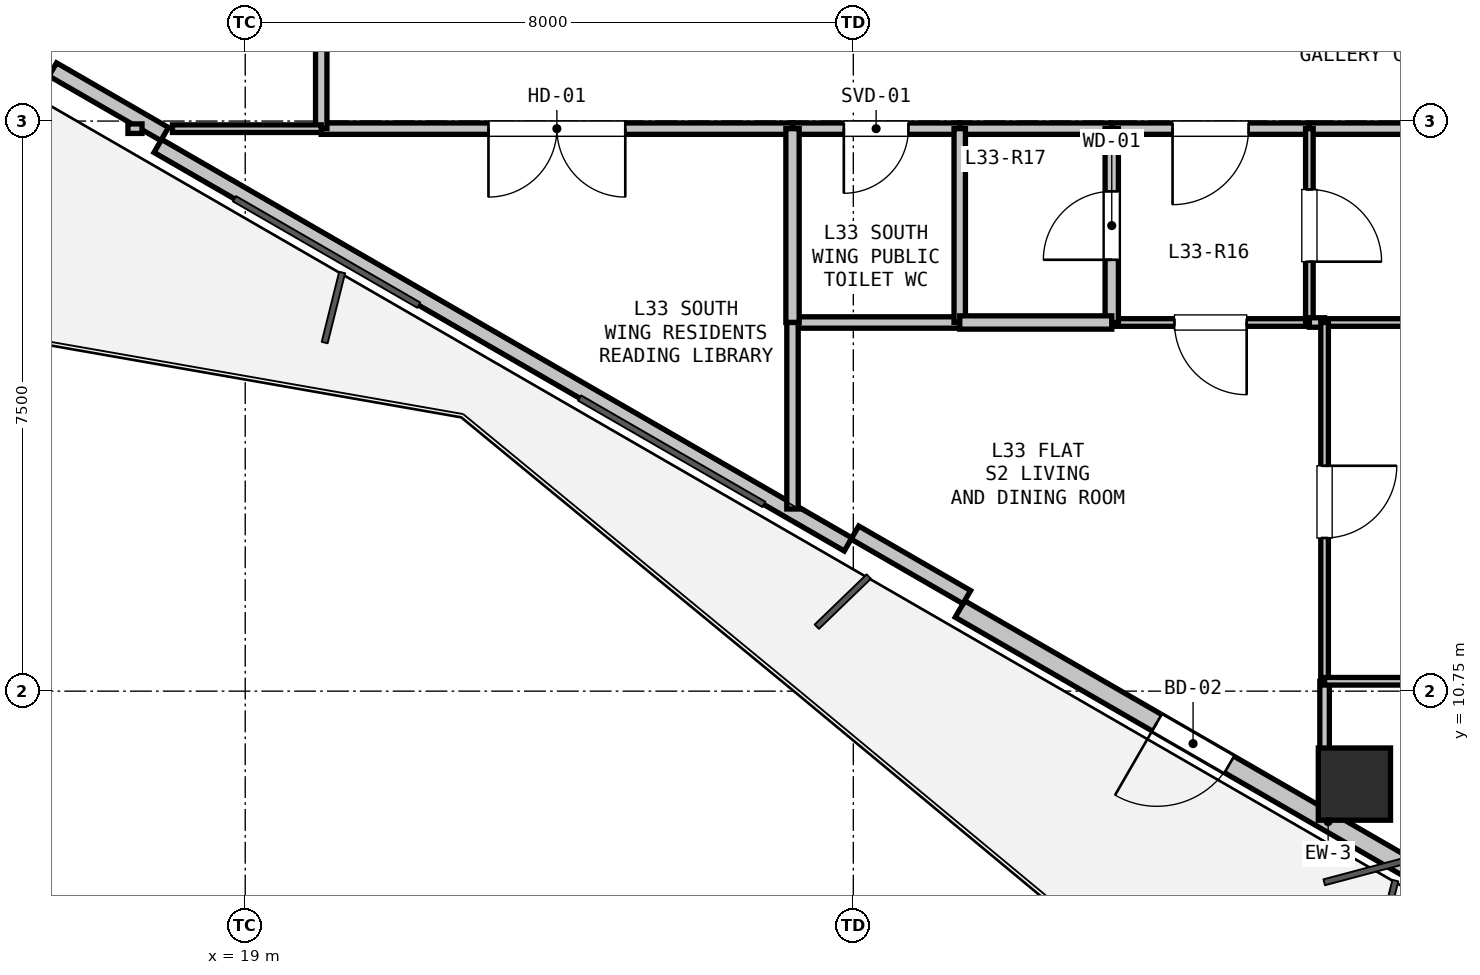
"""IFC4 building model, lengths in metres.
Left out: names, types, materials, properties, quantities, classifications, styles, units other than length and angle.
Written with IfcOpenShell. Run it as: python <this file> out.ifc"""

import sys

from ifc_helpers import new_model, si_unit, direction, frame, frame_2d, origin, origin_2d, place, context, subcontext, project, spatial, rectangle, hollow_rectangle, extrude, element, fill, save


model = new_model("IFC4")
c1 = context("Model", 3, precision=1e-05, world=origin(), true_north=direction((0.0, 1.0)))
c2 = subcontext(c1, "Body", "Model", "MODEL_VIEW")
j1 = project(units=[si_unit("LENGTHUNIT", "METRE"), si_unit("PLANEANGLEUNIT", "RADIAN")], contexts=[c1])
p1 = place(None, origin())
s1 = spatial("IfcSite", under=j1, at=p1, CompositionType="ELEMENT")
p2 = place(p1, origin())
s2 = spatial("IfcBuilding", under=s1, at=p2, CompositionType="ELEMENT")
p3 = place(p2, frame((0.0, 0.0, 121.2)))
s3 = spatial("IfcBuildingStorey", under=s2, at=p3, CompositionType="ELEMENT", Elevation=121.2)
p4 = place(p3, frame((33.593, 9.527, -0.24), z_axis=(0.0, 0.0, 1.0), x_axis=(1.0, 0.0, 0.0)))
e1 = element("IfcColumn", 1, at=p4, inside=s3, PredefinedType="COLUMN", context=c2, shape_type="SweptSolid", body=[
    extrude(hollow_rectangle(XDim=0.95, YDim=0.95, WallThickness=0.028, at=origin_2d()), origin(), (0.0, 0.0, 1.0), 3.54),
])
p5 = place(p3, frame((38.091, 6.237, 0.0), z_axis=(0.0, 0.0, 1.0), x_axis=(-0.86602239209, 0.500005216371, 0.0)))
e2 = element("IfcWall", 2, at=p5, inside=s3, PredefinedType="SOLIDWALL", context=c2, shape_type="SweptSolid", body=[
    extrude(rectangle(XDim=11.186, YDim=0.25, at=frame_2d((5.593, 0.0))), origin(), (0.0, 0.0, 1.0), 2.68),
])
p6 = place(p5, frame((7.095, 0.0, 0.0)))
e3 = element("IfcOpeningElement", 3, at=p6, cuts=e2, PredefinedType="OPENING", context=c2, shape_type="SweptSolid", body=[
    extrude(rectangle(XDim=1.1, YDim=2.1, at=frame_2d((0.55, 1.05))), frame((0.0, 0.135, 0.0), z_axis=(0.0, -1.0, 0.0), x_axis=(1.0, 0.0, 0.0)), (0.0, 0.0, 1.0), 0.27),
])
p7 = place(p5, frame((2.322, 0.0, 0.9)))
e4 = element("IfcOpeningElement", 4, at=p7, cuts=e2, PredefinedType="OPENING", context=c2, shape_type="SweptSolid", body=[
    extrude(rectangle(XDim=1.2, YDim=1.4, at=frame_2d((0.6, 0.7))), frame((0.0, 0.135, 0.0), z_axis=(0.0, -1.0, 0.0), x_axis=(1.0, 0.0, 0.0)), (0.0, 0.0, 1.0), 0.27),
])
p8 = place(p3, frame((26.931, 12.68, 0.0), z_axis=(0.0, 0.0, 1.0), x_axis=(-0.866026619769, 0.499997893847, 0.0)))
e5 = element("IfcWall", 5, at=p8, inside=s3, PredefinedType="PARAPET", context=c2, shape_type="SweptSolid", body=[
    extrude(rectangle(XDim=10.486, YDim=0.2, at=frame_2d((5.243, 0.0))), origin(), (0.0, 0.0, 1.0), 0.2),
])
for number, where, z_axis, x_axis in (
    (6, (28.493, 11.986, 0.0), (0.0, 0.0, 1.0), (-0.866, 0.5, 0.0)),
    (7, (17.94, 18.079, 0.0), (0.0, 0.0, 1.0), (-0.866, 0.5, 0.0)),
):
    element("IfcWall", number, at=place(p3, frame(where, z_axis=z_axis, x_axis=x_axis)), inside=s3, PredefinedType="PARAPET", context=c2, shape_type="SweptSolid", body=[
        extrude(rectangle(XDim=1.7, YDim=0.2, at=frame_2d((0.85, 0.0))), origin(), (0.0, 0.0, 1.0), 2.68),
    ])
p9 = place(p3, frame((39.2, 18.15, 0.0), z_axis=(0.0, 0.0, 1.0), x_axis=(-1.0, 0.0, 0.0)))
e8 = element("IfcWall", 8, at=p9, inside=s3, PredefinedType="PARTITIONING", context=c2, shape_type="SweptSolid", body=[
    extrude(rectangle(XDim=6.2, YDim=0.15, at=frame_2d((3.1, 0.0))), origin(), (0.0, 0.0, 1.0), 2.433),
])
p10 = place(p3, frame((33.0, 18.15, 0.0), z_axis=(0.0, 0.0, 1.0), x_axis=(-1.0, 0.0, 0.0)))
e9 = element("IfcWall", 9, at=p10, inside=s3, PredefinedType="PARTITIONING", context=c2, shape_type="SweptSolid", body=[
    extrude(rectangle(XDim=2.6, YDim=0.15, at=frame_2d((1.3, 0.0))), origin(), (0.0, 0.0, 1.0), 3.06),
])
p11 = place(p10, frame((0.8, 0.0, 0.0)))
e10 = element("IfcOpeningElement", 10, at=p11, cuts=e9, PredefinedType="OPENING", context=c2, shape_type="SweptSolid", body=[
    extrude(rectangle(XDim=1.0, YDim=2.15, at=frame_2d((0.5, 1.075))), frame((0.0, 0.085, 0.0), z_axis=(0.0, -1.0, 0.0), x_axis=(1.0, 0.0, 0.0)), (0.0, 0.0, 1.0), 0.17),
])
p12 = place(p3, frame((30.4, 18.15, 0.0), z_axis=(0.0, 0.0, 1.0), x_axis=(-1.0, 0.0, 0.0)))
e11 = element("IfcWall", 11, at=p12, inside=s3, PredefinedType="PARTITIONING", context=c2, shape_type="SweptSolid", body=[
    extrude(rectangle(XDim=2.0, YDim=0.15, at=frame_2d((1.0, 0.0))), origin(), (0.0, 0.0, 1.0), 3.06),
])
p13 = place(p3, frame((28.4, 18.15, 0.0), z_axis=(0.0, 0.0, 1.0), x_axis=(-1.0, 0.0, 0.0)))
e12 = element("IfcWall", 12, at=p13, inside=s3, PredefinedType="PARTITIONING", context=c2, shape_type="SweptSolid", body=[
    extrude(rectangle(XDim=2.2, YDim=0.15, at=frame_2d((1.1, 0.0))), origin(), (0.0, 0.0, 1.0), 3.06),
])
p14 = place(p13, frame((0.675, 0.0, 0.0)))
e13 = element("IfcOpeningElement", 13, at=p14, cuts=e12, PredefinedType="OPENING", context=c2, shape_type="SweptSolid", body=[
    extrude(rectangle(XDim=0.85, YDim=2.1, at=frame_2d((0.425, 1.05))), frame((0.0, 0.085, 0.0), z_axis=(0.0, -1.0, 0.0), x_axis=(1.0, 0.0, 0.0)), (0.0, 0.0, 1.0), 0.17),
])
p15 = place(p3, frame((26.2, 18.15, 0.0), z_axis=(0.0, 0.0, 1.0), x_axis=(-1.0, 0.0, 0.0)))
e14 = element("IfcWall", 14, at=p15, inside=s3, PredefinedType="PARTITIONING", context=c2, shape_type="SweptSolid", body=[
    extrude(rectangle(XDim=6.2, YDim=0.15, at=frame_2d((3.1, 0.0))), origin(), (0.0, 0.0, 1.0), 2.433),
])
p16 = place(p15, frame((2.2, 0.0, 0.0)))
e15 = element("IfcOpeningElement", 15, at=p16, cuts=e14, PredefinedType="OPENING", context=c2, shape_type="SweptSolid", body=[
    extrude(rectangle(XDim=1.8, YDim=2.2, at=frame_2d((0.9, 1.1))), frame((0.0, 0.085, 0.0), z_axis=(0.0, -1.0, 0.0), x_axis=(1.0, 0.0, 0.0)), (0.0, 0.0, 1.0), 0.17),
])
p17 = place(p3, frame((20.0, 18.15, 0.0), z_axis=(0.0, 0.0, 1.0), x_axis=(0.0, 1.0, 0.0)))
e16 = element("IfcWall", 16, at=p17, inside=s3, PredefinedType="PARTITIONING", context=c2, shape_type="SweptSolid", body=[
    extrude(rectangle(XDim=2.6, YDim=0.15, at=frame_2d((1.3, 0.0))), origin(), (0.0, 0.0, 1.0), 3.06),
])
p18 = place(p3, frame((33.0, 15.6, 0.0), z_axis=(0.0, 0.0, 1.0), x_axis=(-1.0, 0.0, 0.0)))
e17 = element("IfcWall", 17, at=p18, inside=s3, PredefinedType="PARTITIONING", context=c2, shape_type="SweptSolid", body=[
    extrude(rectangle(XDim=2.6, YDim=0.1, at=frame_2d((1.3, 0.0))), origin(), (0.0, 0.0, 1.0), 3.06),
])
p19 = place(p18, frame((0.825, 0.0, 0.0)))
e18 = element("IfcOpeningElement", 18, at=p19, cuts=e17, PredefinedType="OPENING", context=c2, shape_type="SweptSolid", body=[
    extrude(rectangle(XDim=0.95, YDim=2.1, at=frame_2d((0.475, 1.05))), frame((0.0, 0.06, 0.0), z_axis=(0.0, -1.0, 0.0), x_axis=(1.0, 0.0, 0.0)), (0.0, 0.0, 1.0), 0.12),
])
p20 = place(p3, frame((30.4, 15.6, 0.0), z_axis=(0.0, 0.0, 1.0), x_axis=(0.0, 1.0, 0.0)))
e19 = element("IfcWall", 19, at=p20, inside=s3, PredefinedType="PLUMBINGWALL", context=c2, shape_type="SweptSolid", body=[
    extrude(rectangle(XDim=2.55, YDim=0.175, at=frame_2d((1.275, 0.0))), origin(), (0.0, 0.0, 1.0), 3.06),
])
p21 = place(p20, frame((0.825, 0.0, 0.0)))
e20 = element("IfcOpeningElement", 20, at=p21, cuts=e19, PredefinedType="OPENING", context=c2, shape_type="SweptSolid", body=[
    extrude(rectangle(XDim=0.9, YDim=2.1, at=frame_2d((0.45, 1.05))), frame((0.0, 0.097, 0.0), z_axis=(0.0, -1.0, 0.0), x_axis=(1.0, 0.0, 0.0)), (0.0, 0.0, 1.0), 0.195),
])
p22 = place(p3, frame((33.0, 18.15, 0.0), z_axis=(0.0, 0.0, 1.0), x_axis=(0.0, -1.0, 0.0)))
e21 = element("IfcWall", 21, at=p22, inside=s3, PredefinedType="PARTITIONING", context=c2, shape_type="SweptSolid", body=[
    extrude(rectangle(XDim=2.55, YDim=0.1, at=frame_2d((1.275, 0.0))), origin(), (0.0, 0.0, 1.0), 3.06),
])
p23 = place(p22, frame((0.8, 0.0, 0.0)))
e22 = element("IfcOpeningElement", 22, at=p23, cuts=e21, PredefinedType="OPENING", context=c2, shape_type="SweptSolid", body=[
    extrude(rectangle(XDim=0.95, YDim=2.1, at=frame_2d((0.475, 1.05))), frame((0.0, 0.06, 0.0), z_axis=(0.0, -1.0, 0.0), x_axis=(1.0, 0.0, 0.0)), (0.0, 0.0, 1.0), 0.12),
])
p24 = place(p3, frame((28.4, 15.6, 0.0), z_axis=(0.0, 0.0, 1.0), x_axis=(-1.0, 0.0, 0.0)))
e23 = element("IfcWall", 23, at=p24, inside=s3, PredefinedType="PARTITIONING", context=c2, shape_type="SweptSolid", body=[
    extrude(rectangle(XDim=2.2, YDim=0.15, at=frame_2d((1.1, 0.0))), origin(), (0.0, 0.0, 1.0), 2.433),
])
p25 = place(p3, frame((26.2, 15.6, 0.0), z_axis=(0.0, 0.0, 1.0), x_axis=(0.0, 1.0, 0.0)))
e24 = element("IfcWall", 24, at=p25, inside=s3, PredefinedType="PLUMBINGWALL", context=c2, shape_type="SweptSolid", body=[
    extrude(rectangle(XDim=2.55, YDim=0.175, at=frame_2d((1.275, 0.0))), origin(), (0.0, 0.0, 1.0), 2.433),
])
p26 = place(p3, frame((28.4, 18.15, 0.0), z_axis=(0.0, 0.0, 1.0), x_axis=(0.0, -1.0, 0.0)))
e25 = element("IfcWall", 25, at=p26, inside=s3, PredefinedType="PARTITIONING", context=c2, shape_type="SweptSolid", body=[
    extrude(rectangle(XDim=2.55, YDim=0.15, at=frame_2d((1.275, 0.0))), origin(), (0.0, 0.0, 1.0), 3.06),
])
p27 = place(p3, frame((30.4, 15.6, 0.0), z_axis=(0.0, 0.0, 1.0), x_axis=(-1.0, 0.0, 0.0)))
e26 = element("IfcWall", 26, at=p27, inside=s3, PredefinedType="PLUMBINGWALL", context=c2, shape_type="SweptSolid", body=[
    extrude(rectangle(XDim=2.0, YDim=0.175, at=frame_2d((1.0, 0.0))), origin(), (0.0, 0.0, 1.0), 3.06),
])
p28 = place(p3, frame((42.07, 15.6, 0.0), z_axis=(0.0, 0.0, 1.0), x_axis=(-1.0, 0.0, 0.0)))
e27 = element("IfcWall", 27, at=p28, inside=s3, PredefinedType="PARTITIONING", context=c2, shape_type="SweptSolid", body=[
    extrude(rectangle(XDim=8.87, YDim=0.1, at=frame_2d((4.435, 0.0))), origin(), (0.0, 0.0, 1.0), 2.365),
])
p29 = place(p28, frame((3.96, 0.0, 0.0)))
e28 = element("IfcOpeningElement", 28, at=p29, cuts=e27, PredefinedType="OPENING", context=c2, shape_type="SweptSolid", body=[
    extrude(rectangle(XDim=0.95, YDim=2.1, at=frame_2d((0.475, 1.05))), frame((0.0, 0.06, 0.0), z_axis=(0.0, -1.0, 0.0), x_axis=(1.0, 0.0, 0.0)), (0.0, 0.0, 1.0), 0.12),
])
p30 = place(p3, frame((33.2, 15.6, 0.0), z_axis=(0.0, 0.0, 1.0), x_axis=(-1.0, 0.0, 0.0)))
e29 = element("IfcWall", 29, at=p30, inside=s3, PredefinedType="PARTITIONING", context=c2, shape_type="SweptSolid", body=[
    extrude(rectangle(XDim=0.2, YDim=0.125, at=frame_2d((0.1, 0.0))), origin(), (0.0, 0.0, 1.0), 3.06),
])
p31 = place(p3, frame((17.457, 18.15, 0.0), z_axis=(0.0, 0.0, 1.0), x_axis=(1.0, 0.0, 0.0)))
e30 = element("IfcWall", 30, at=p31, inside=s3, PredefinedType="PARTITIONING", context=c2, shape_type="SweptSolid", body=[
    extrude(rectangle(XDim=0.185, YDim=0.125, at=frame_2d((0.093, 0.0))), origin(), (0.0, 0.0, 1.0), 3.06),
])
p32 = place(p3, frame((18.042, 18.15, 0.0), z_axis=(0.0, 0.0, 1.0), x_axis=(1.0, 0.0, 0.0)))
e31 = element("IfcWall", 31, at=p32, inside=s3, PredefinedType="PARTITIONING", context=c2, shape_type="SweptSolid", body=[
    extrude(rectangle(XDim=1.958, YDim=0.1, at=frame_2d((0.979, 0.0))), origin(), (0.0, 0.0, 1.0), 2.365),
])
p33 = place(p3, frame((26.2, 15.6, 0.0), z_axis=(0.0, 0.0, 1.0), x_axis=(0.0, -1.0, 0.0)))
e32 = element("IfcWall", 32, at=p33, inside=s3, PredefinedType="PARTITIONING", context=c2, shape_type="SweptSolid", body=[
    extrude(rectangle(XDim=2.454, YDim=0.15, at=frame_2d((1.227, 0.0))), origin(), (0.0, 0.0, 1.0), 2.365),
])
p34 = place(p3, frame((33.2, 15.6, 0.0), z_axis=(0.0, 0.0, 1.0), x_axis=(0.0, -1.0, 0.0)))
e33 = element("IfcWall", 33, at=p34, inside=s3, PredefinedType="PARTITIONING", context=c2, shape_type="SweptSolid", body=[
    extrude(rectangle(XDim=4.72, YDim=0.1, at=frame_2d((2.36, 0.0))), origin(), (0.0, 0.0, 1.0), 3.06),
])
p35 = place(p34, frame((1.885, 0.0, 0.0)))
e34 = element("IfcOpeningElement", 34, at=p35, cuts=e33, PredefinedType="OPENING", context=c2, shape_type="SweptSolid", body=[
    extrude(rectangle(XDim=0.95, YDim=2.1, at=frame_2d((0.475, 1.05))), frame((0.0, 0.06, 0.0), z_axis=(0.0, -1.0, 0.0), x_axis=(1.0, 0.0, 0.0)), (0.0, 0.0, 1.0), 0.12),
])
p36 = place(p3, frame((33.2, 10.88, 0.0), z_axis=(0.0, 0.0, 1.0), x_axis=(0.0, -1.0, 0.0)))
e35 = element("IfcWall", 35, at=p36, inside=s3, PredefinedType="PARTITIONING", context=c2, shape_type="SweptSolid", body=[
    extrude(rectangle(XDim=1.647, YDim=0.125, at=frame_2d((0.823, 0.0))), origin(), (0.0, 0.0, 1.0), 2.365),
])
p37 = place(p3, frame((33.2, 10.88, 0.0), z_axis=(0.0, 0.0, 1.0), x_axis=(1.0, 0.0, 0.0)))
e36 = element("IfcWall", 36, at=p37, inside=s3, PredefinedType="PARTITIONING", context=c2, shape_type="SweptSolid", body=[
    extrude(rectangle(XDim=8.87, YDim=0.1, at=frame_2d((4.435, 0.0))), origin(), (0.0, 0.0, 1.0), 2.433),
])
p38 = place(p37, frame((3.96, 0.0, 0.0)))
e37 = element("IfcOpeningElement", 37, at=p38, cuts=e36, PredefinedType="OPENING", context=c2, shape_type="SweptSolid", body=[
    extrude(rectangle(XDim=0.95, YDim=2.1, at=frame_2d((0.475, 1.05))), frame((0.0, 0.06, 0.0), z_axis=(0.0, -1.0, 0.0), x_axis=(1.0, 0.0, 0.0)), (0.0, 0.0, 1.0), 0.12),
])
p39 = place(p6, origin())
e38 = element("IfcDoor", 38, at=p39, inside=s3, OperationType="SINGLE_SWING_RIGHT", PredefinedType="DOOR", context=c2, shape_type="SweptSolid", body=[
    extrude(rectangle(XDim=1.1, YDim=2.1, at=frame_2d((0.55, 1.05))), frame((0.0, 0.025, 0.0), z_axis=(0.0, -1.0, 0.0), x_axis=(1.0, 0.0, 0.0)), (0.0, 0.0, 1.0), 0.05),
])
fill(e3, e38)
p40 = place(p11, origin())
e39 = element("IfcDoor", 39, at=p40, inside=s3, OperationType="SINGLE_SWING_RIGHT", PredefinedType="DOOR", context=c2, shape_type="SweptSolid", body=[
    extrude(rectangle(XDim=1.0, YDim=2.15, at=frame_2d((0.5, 1.075))), frame((0.0, 0.025, 0.0), z_axis=(0.0, -1.0, 0.0), x_axis=(1.0, 0.0, 0.0)), (0.0, 0.0, 1.0), 0.05),
])
fill(e10, e39)
p41 = place(p14, origin())
e40 = element("IfcDoor", 40, at=p41, inside=s3, OperationType="SINGLE_SWING_RIGHT", PredefinedType="DOOR", context=c2, shape_type="SweptSolid", body=[
    extrude(rectangle(XDim=0.85, YDim=2.1, at=frame_2d((0.425, 1.05))), frame((0.0, 0.025, 0.0), z_axis=(0.0, -1.0, 0.0), x_axis=(1.0, 0.0, 0.0)), (0.0, 0.0, 1.0), 0.05),
])
fill(e13, e40)
p42 = place(p16, origin())
e41 = element("IfcDoor", 41, at=p42, inside=s3, OperationType="DOUBLE_DOOR_SINGLE_SWING", PredefinedType="DOOR", context=c2, shape_type="SweptSolid", body=[
    extrude(rectangle(XDim=1.8, YDim=2.2, at=frame_2d((0.9, 1.1))), frame((0.0, 0.025, 0.0), z_axis=(0.0, -1.0, 0.0), x_axis=(1.0, 0.0, 0.0)), (0.0, 0.0, 1.0), 0.05),
])
fill(e15, e41)
p43 = place(p21, origin())
e42 = element("IfcDoor", 42, at=p43, inside=s3, OperationType="SINGLE_SWING_LEFT", PredefinedType="DOOR", context=c2, shape_type="SweptSolid", body=[
    extrude(rectangle(XDim=0.9, YDim=2.1, at=frame_2d((0.45, 1.05))), frame((0.0, 0.025, 0.0), z_axis=(0.0, -1.0, 0.0), x_axis=(1.0, 0.0, 0.0)), (0.0, 0.0, 1.0), 0.05),
])
fill(e20, e42)
p44 = place(p23, origin())
e43 = element("IfcDoor", 43, at=p44, inside=s3, OperationType="SINGLE_SWING_RIGHT", PredefinedType="DOOR", context=c2, shape_type="SweptSolid", body=[
    extrude(rectangle(XDim=0.95, YDim=2.1, at=frame_2d((0.475, 1.05))), frame((0.0, 0.025, 0.0), z_axis=(0.0, -1.0, 0.0), x_axis=(1.0, 0.0, 0.0)), (0.0, 0.0, 1.0), 0.05),
])
fill(e22, e43)
p45 = place(p19, origin())
e44 = element("IfcDoor", 44, at=p45, inside=s3, OperationType="SINGLE_SWING_LEFT", PredefinedType="DOOR", context=c2, shape_type="SweptSolid", body=[
    extrude(rectangle(XDim=0.95, YDim=2.1, at=frame_2d((0.475, 1.05))), frame((0.0, 0.025, 0.0), z_axis=(0.0, -1.0, 0.0), x_axis=(1.0, 0.0, 0.0)), (0.0, 0.0, 1.0), 0.05),
])
fill(e18, e44)
p46 = place(p35, origin())
e45 = element("IfcDoor", 45, at=p46, inside=s3, OperationType="SINGLE_SWING_LEFT", PredefinedType="DOOR", context=c2, shape_type="SweptSolid", body=[
    extrude(rectangle(XDim=0.95, YDim=2.1, at=frame_2d((0.475, 1.05))), frame((0.0, 0.025, 0.0), z_axis=(0.0, -1.0, 0.0), x_axis=(1.0, 0.0, 0.0)), (0.0, 0.0, 1.0), 0.05),
])
fill(e34, e45)
save(model, sys.argv[1])
